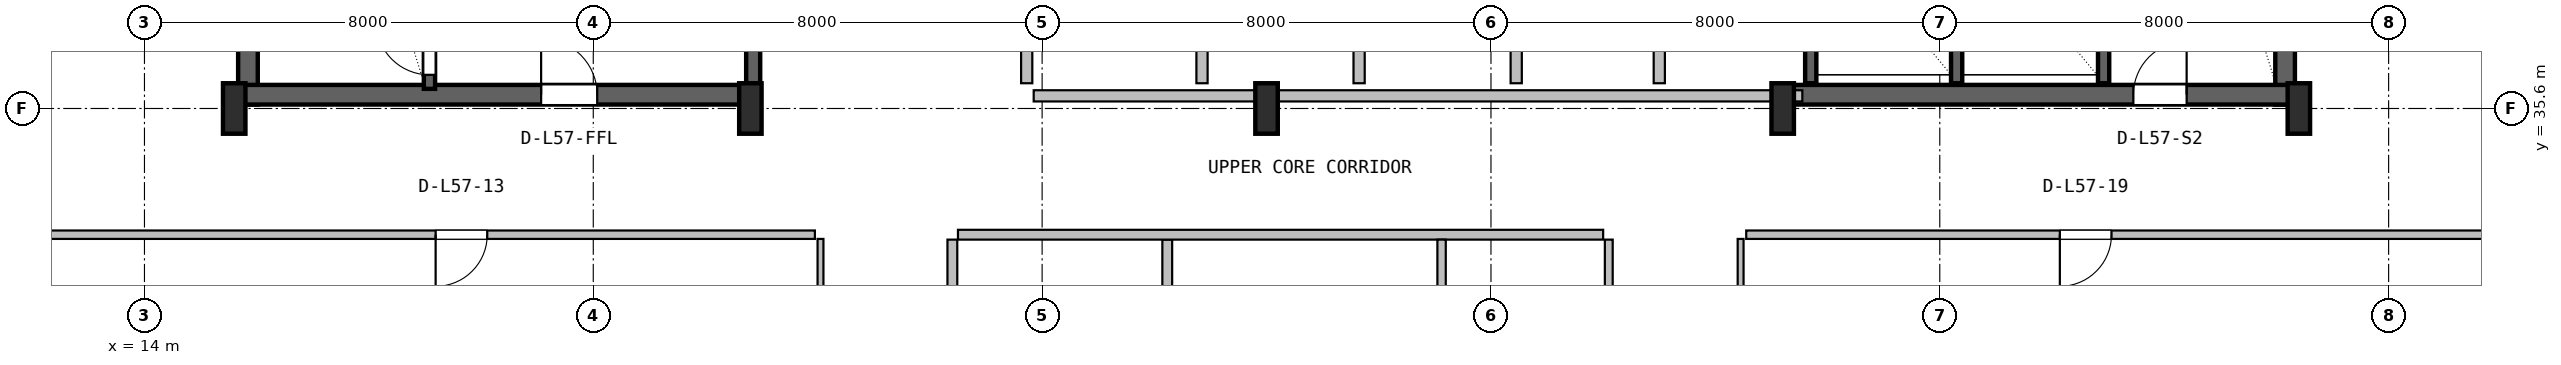
"""IFC4 building model, lengths in metres.
Left out: names, types, materials, properties, quantities, classifications, styles, units other than length and angle.
Written with IfcOpenShell. Run it as: python <this file> out.ifc"""

import sys

from ifc_helpers import new_model, si_unit, direction, frame, frame_2d, origin, origin_2d, place, context, subcontext, project, spatial, rectangle, i_section, extrude, source, transform, mapped, element, fill, save


model = new_model("IFC4")
c1 = context("Model", 3, precision=1e-05, world=origin(), true_north=direction((0.0, 1.0)))
c2 = subcontext(c1, "Body", "Model", "MODEL_VIEW")
j1 = project(units=[si_unit("LENGTHUNIT", "METRE"), si_unit("PLANEANGLEUNIT", "RADIAN")], contexts=[c1])
p1 = place(None, origin())
s1 = spatial("IfcSite", under=j1, at=p1, CompositionType="ELEMENT")
p2 = place(p1, origin())
s2 = spatial("IfcBuilding", under=s1, at=p2, CompositionType="ELEMENT")
p3 = place(p2, frame((0.0, 0.0, 230.2)))
s3 = spatial("IfcBuildingStorey", under=s2, at=p3, CompositionType="ELEMENT", Elevation=230.2)
for number, where, z_axis, x_axis in (
    (1, (15.845, 35.67, 0.0), (0.0, 0.0, 1.0), (0.0, 1.0, 0.0)),
    (2, (52.155, 35.67, 0.0), (0.0, 0.0, 1.0), (0.0, 1.0, 0.0)),
):
    element("IfcWall", number, at=place(p3, frame(where, z_axis=z_axis, x_axis=x_axis)), inside=s3, PredefinedType="SHEAR", context=c2, shape_type="SweptSolid", body=[
        extrude(rectangle(XDim=11.13, YDim=0.35, at=frame_2d((5.565, 0.0))), origin(), (0.0, 0.0, 1.0), 3.48),
    ])
p4 = place(p3, frame((15.67, 35.845, 0.0), z_axis=(0.0, 0.0, 1.0), x_axis=(1.0, 0.0, 0.0)))
e3 = element("IfcWall", 3, at=p4, inside=s3, PredefinedType="SHEAR", context=c2, shape_type="SweptSolid", body=[
    extrude(rectangle(XDim=9.13, YDim=0.35, at=frame_2d((4.565, 0.0))), origin(), (0.0, 0.0, 1.0), 3.48),
])
p5 = place(p4, frame((5.4, 0.0, 0.0)))
e4 = element("IfcOpeningElement", 4, at=p5, cuts=e3, PredefinedType="OPENING", context=c2, shape_type="SweptSolid", body=[
    extrude(rectangle(XDim=1.0, YDim=2.1, at=frame_2d((0.5, 1.05))), frame((0.0, 0.185, 0.0), z_axis=(0.0, -1.0, 0.0), x_axis=(1.0, 0.0, 0.0)), (0.0, 0.0, 1.0), 0.37),
])
p6 = place(p3, frame((43.2, 35.845, 0.0), z_axis=(0.0, 0.0, 1.0), x_axis=(1.0, 0.0, 0.0)))
e5 = element("IfcWall", 5, at=p6, inside=s3, PredefinedType="SHEAR", context=c2, shape_type="SweptSolid", body=[
    extrude(rectangle(XDim=9.13, YDim=0.35, at=frame_2d((4.565, 0.0))), origin(), (0.0, 0.0, 1.0), 3.48),
])
p7 = place(p6, frame((6.25, 0.0, 0.0)))
e6 = element("IfcOpeningElement", 6, at=p7, cuts=e5, PredefinedType="OPENING", context=c2, shape_type="SweptSolid", body=[
    extrude(rectangle(XDim=0.95, YDim=2.1, at=frame_2d((0.475, 1.05))), frame((0.0, 0.185, 0.0), z_axis=(0.0, -1.0, 0.0), x_axis=(1.0, 0.0, 0.0)), (0.0, 0.0, 1.0), 0.37),
])
m1 = source(origin(), c2, "Body", "SweptSolid", [
    extrude(i_section(OverallWidth=0.4, OverallDepth=0.9, WebThickness=0.016, FlangeThickness=0.028, FilletRadius=0.016, at=origin_2d()), origin(), (0.0, 0.0, 1.0), 3.8),
])
for number, where, z_axis, x_axis in (
    (7, (15.6, 35.6, 0.0), (0.0, 0.0, 1.0), (1.0, 0.0, 0.0)),
    (8, (24.8, 35.6, 0.0), (0.0, 0.0, 1.0), (1.0, 0.0, 0.0)),
    (9, (34.0, 35.6, 0.0), (0.0, 0.0, 1.0), (1.0, 0.0, 0.0)),
    (10, (43.2, 35.6, 0.0), (0.0, 0.0, 1.0), (1.0, 0.0, 0.0)),
    (11, (52.4, 35.6, 0.0), (0.0, 0.0, 1.0), (1.0, 0.0, 0.0)),
):
    element("IfcColumn", number, at=place(p3, frame(where, z_axis=z_axis, x_axis=x_axis)), inside=s3, PredefinedType="COLUMN", context=c2, shape_type="MappedRepresentation", body=[
        mapped(m1, transform((0.0, 0.0, 0.0), x_axis=(1.0, 0.0, 0.0), y_axis=(0.0, 1.0, 0.0), z_axis=(0.0, 0.0, 1.0), scale=1.0)),
    ])
p8 = place(p3, frame((19.08, 35.95, 0.0), z_axis=(0.0, 0.0, 1.0), x_axis=(0.0, 1.0, 0.0)))
e12 = element("IfcWall", 12, at=p8, inside=s3, PredefinedType="SHEAR", context=c2, shape_type="SweptSolid", body=[
    extrude(rectangle(XDim=9.65, YDim=0.2, at=frame_2d((4.825, 0.0))), origin(), (0.0, 0.0, 1.0), 3.48),
])
p9 = place(p8, frame((0.25, 0.0, 0.0)))
e13 = element("IfcOpeningElement", 13, at=p9, cuts=e12, PredefinedType="OPENING", context=c2, shape_type="SweptSolid", body=[
    extrude(rectangle(XDim=0.95, YDim=2.1, at=frame_2d((0.475, 1.05))), frame((0.0, 0.11, 0.0), z_axis=(0.0, -1.0, 0.0), x_axis=(1.0, 0.0, 0.0)), (0.0, 0.0, 1.0), 0.22),
])
p10 = place(p3, frame((24.85, 36.05, 0.0), z_axis=(0.0, 0.0, 1.0), x_axis=(0.0, 1.0, 0.0)))
e14 = element("IfcWall", 14, at=p10, inside=s3, PredefinedType="SHEAR", context=c2, shape_type="SweptSolid", body=[
    extrude(rectangle(XDim=10.45, YDim=0.25, at=frame_2d((5.225, 0.0))), origin(), (0.0, 0.0, 1.0), 3.48),
])
p11 = place(p3, frame((48.92, 36.05, 0.0), z_axis=(0.0, 0.0, 1.0), x_axis=(0.0, 1.0, 0.0)))
e15 = element("IfcWall", 15, at=p11, inside=s3, PredefinedType="SHEAR", context=c2, shape_type="SweptSolid", body=[
    extrude(rectangle(XDim=10.5, YDim=0.2, at=frame_2d((5.25, 0.0))), origin(), (0.0, 0.0, 1.0), 3.48),
])
for number, where, z_axis, x_axis in (
    (16, (43.7, 36.05, 0.0), (0.0, 0.0, 1.0), (0.0, 1.0, 0.0)),
    (17, (46.3, 36.05, 0.0), (0.0, 0.0, 1.0), (0.0, 1.0, 0.0)),
):
    element("IfcWall", number, at=place(p3, frame(where, z_axis=z_axis, x_axis=x_axis)), inside=s3, PredefinedType="SHEAR", context=c2, shape_type="SweptSolid", body=[
        extrude(rectangle(XDim=3.05, YDim=0.2, at=frame_2d((1.525, 0.0))), origin(), (0.0, 0.0, 1.0), 3.48),
    ])
p12 = place(p3, frame((29.85, 35.825, 0.0), z_axis=(0.0, 0.0, 1.0), x_axis=(1.0, 0.0, 0.0)))
e18 = element("IfcWall", 18, at=p12, inside=s3, PredefinedType="SOLIDWALL", context=c2, shape_type="SweptSolid", body=[
    extrude(rectangle(XDim=13.7, YDim=0.2, at=frame_2d((6.85, 0.0))), origin(), (0.0, 0.0, 1.0), 2.505),
])
for number, where, z_axis, x_axis in (
    (19, (32.85, 36.05, 0.0), (0.0, 0.0, 1.0), (0.0, 1.0, 0.0)),
    (20, (29.725, 36.05, 0.0), (0.0, 0.0, 1.0), (0.0, 1.0, 0.0)),
    (21, (35.65, 36.05, 0.0), (0.0, 0.0, 1.0), (0.0, 1.0, 0.0)),
    (22, (38.45, 36.05, 0.0), (0.0, 0.0, 1.0), (0.0, 1.0, 0.0)),
):
    element("IfcWall", number, at=place(p3, frame(where, z_axis=z_axis, x_axis=x_axis)), inside=s3, PredefinedType="PLUMBINGWALL", context=c2, shape_type="SweptSolid", body=[
        extrude(rectangle(XDim=3.1, YDim=0.2, at=frame_2d((1.55, 0.0))), origin(), (0.0, 0.0, 1.0), 3.46),
    ])
p13 = place(p3, frame((41.0, 36.05, 0.0), z_axis=(0.0, 0.0, 1.0), x_axis=(0.0, 1.0, 0.0)))
e23 = element("IfcWall", 23, at=p13, inside=s3, PredefinedType="SOLIDWALL", context=c2, shape_type="SweptSolid", body=[
    extrude(rectangle(XDim=3.1, YDim=0.2, at=frame_2d((1.55, 0.0))), origin(), (0.0, 0.0, 1.0), 3.46),
])
p14 = place(p3, frame((26.05, 22.235, 0.0), z_axis=(0.0, 0.0, 1.0), x_axis=(0.0, 1.0, 0.0)))
e24 = element("IfcWall", 24, at=p14, inside=s3, PredefinedType="PARTITIONING", context=c2, shape_type="SweptSolid", body=[
    extrude(rectangle(XDim=11.04, YDim=0.105, at=frame_2d((5.52, 0.0))), origin(), (0.0, 0.0, 1.0), 2.838),
])
p15 = place(p14, frame((0.385, 0.0, 0.0)))
e25 = element("IfcOpeningElement", 25, at=p15, cuts=e24, PredefinedType="OPENING", context=c2, shape_type="SweptSolid", body=[
    extrude(rectangle(XDim=0.88, YDim=2.06, at=frame_2d((0.44, 1.03))), frame((0.0, 0.062, 0.0), z_axis=(0.0, -1.0, 0.0), x_axis=(1.0, 0.0, 0.0)), (0.0, 0.0, 1.0), 0.125),
])
p16 = place(p14, frame((3.975, 0.0, 0.0)))
e26 = element("IfcOpeningElement", 26, at=p16, cuts=e24, PredefinedType="OPENING", context=c2, shape_type="SweptSolid", body=[
    extrude(rectangle(XDim=0.92, YDim=2.08, at=frame_2d((0.46, 1.04))), frame((0.0, 0.062, 0.0), z_axis=(0.0, -1.0, 0.0), x_axis=(1.0, 0.0, 0.0)), (0.0, 0.0, 1.0), 0.125),
])
p17 = place(p3, frame((9.68, 33.35, 0.0), z_axis=(0.0, 0.0, 1.0), x_axis=(1.0, 0.0, 0.0)))
e27 = element("IfcWall", 27, at=p17, inside=s3, PredefinedType="PARTITIONING", context=c2, shape_type="SweptSolid", body=[
    extrude(rectangle(XDim=16.27, YDim=0.15, at=frame_2d((8.135, 0.0))), origin(), (0.0, 0.0, 1.0), 2.838),
])
p18 = place(p17, frame((9.51, 0.0, 0.0)))
e28 = element("IfcOpeningElement", 28, at=p18, cuts=e27, PredefinedType="OPENING", context=c2, shape_type="SweptSolid", body=[
    extrude(rectangle(XDim=0.92, YDim=2.08, at=frame_2d((0.46, 1.04))), frame((0.0, 0.085, 0.0), z_axis=(0.0, -1.0, 0.0), x_axis=(1.0, 0.0, 0.0)), (0.0, 0.0, 1.0), 0.17),
])
p19 = place(p3, frame((32.23, 24.598, 0.0), z_axis=(0.0, 0.0, 1.0), x_axis=(0.0, 1.0, 0.0)))
e29 = element("IfcWall", 29, at=p19, inside=s3, PredefinedType="PARTITIONING", context=c2, shape_type="SweptSolid", body=[
    extrude(rectangle(XDim=8.665, YDim=0.175, at=frame_2d((4.333, 0.0))), origin(), (0.0, 0.0, 1.0), 3.152),
])
p20 = place(p3, frame((28.5, 33.35, 0.0), z_axis=(0.0, 0.0, 1.0), x_axis=(1.0, 0.0, 0.0)))
e30 = element("IfcWall", 30, at=p20, inside=s3, PredefinedType="PARTITIONING", context=c2, shape_type="SweptSolid", body=[
    extrude(rectangle(XDim=11.5, YDim=0.175, at=frame_2d((5.75, 0.0))), origin(), (0.0, 0.0, 1.0), 2.838),
])
p21 = place(p3, frame((28.4, 24.598, 0.0), z_axis=(0.0, 0.0, 1.0), x_axis=(0.0, 1.0, 0.0)))
e31 = element("IfcWall", 31, at=p21, inside=s3, PredefinedType="PARTITIONING", context=c2, shape_type="SweptSolid", body=[
    extrude(rectangle(XDim=8.665, YDim=0.175, at=frame_2d((4.333, 0.0))), origin(), (0.0, 0.0, 1.0), 3.152),
])
p22 = place(p21, frame((3.807, 0.0, 0.0)))
e32 = element("IfcOpeningElement", 32, at=p22, cuts=e31, PredefinedType="OPENING", context=c2, shape_type="SweptSolid", body=[
    extrude(rectangle(XDim=1.05, YDim=2.1, at=frame_2d((0.525, 1.05))), frame((0.0, 0.098, 0.0), z_axis=(0.0, -1.0, 0.0), x_axis=(1.0, 0.0, 0.0)), (0.0, 0.0, 1.0), 0.195),
])
p23 = place(p3, frame((37.12, 24.598, 0.0), z_axis=(0.0, 0.0, 1.0), x_axis=(0.0, 1.0, 0.0)))
e33 = element("IfcWall", 33, at=p23, inside=s3, PredefinedType="PARTITIONING", context=c2, shape_type="SweptSolid", body=[
    extrude(rectangle(XDim=8.665, YDim=0.15, at=frame_2d((4.333, 0.0))), origin(), (0.0, 0.0, 1.0), 3.152),
])
p24 = place(p3, frame((40.1, 24.598, 0.0), z_axis=(0.0, 0.0, 1.0), x_axis=(0.0, 1.0, 0.0)))
e34 = element("IfcWall", 34, at=p24, inside=s3, PredefinedType="PARTITIONING", context=c2, shape_type="SweptSolid", body=[
    extrude(rectangle(XDim=8.665, YDim=0.14, at=frame_2d((4.333, 0.0))), origin(), (0.0, 0.0, 1.0), 3.152),
])
p25 = place(p24, frame((3.832, 0.0, 0.0)))
e35 = element("IfcOpeningElement", 35, at=p25, cuts=e34, PredefinedType="OPENING", context=c2, shape_type="SweptSolid", body=[
    extrude(rectangle(XDim=1.0, YDim=2.1, at=frame_2d((0.5, 1.05))), frame((0.0, 0.08, 0.0), z_axis=(0.0, -1.0, 0.0), x_axis=(1.0, 0.0, 0.0)), (0.0, 0.0, 1.0), 0.16),
])
p26 = place(p3, frame((42.45, 22.235, 0.0), z_axis=(0.0, 0.0, 1.0), x_axis=(0.0, 1.0, 0.0)))
e36 = element("IfcWall", 36, at=p26, inside=s3, PredefinedType="PARTITIONING", context=c2, shape_type="SweptSolid", body=[
    extrude(rectangle(XDim=11.04, YDim=0.105, at=frame_2d((5.52, 0.0))), origin(), (0.0, 0.0, 1.0), 2.838),
])
p27 = place(p26, frame((2.57, 0.0, 0.0)))
e37 = element("IfcOpeningElement", 37, at=p27, cuts=e36, PredefinedType="OPENING", context=c2, shape_type="SweptSolid", body=[
    extrude(rectangle(XDim=0.88, YDim=2.06, at=frame_2d((0.44, 1.03))), frame((0.0, 0.062, 0.0), z_axis=(0.0, -1.0, 0.0), x_axis=(1.0, 0.0, 0.0)), (0.0, 0.0, 1.0), 0.125),
])
p28 = place(p26, frame((5.605, 0.0, 0.0)))
e38 = element("IfcOpeningElement", 38, at=p28, cuts=e36, PredefinedType="OPENING", context=c2, shape_type="SweptSolid", body=[
    extrude(rectangle(XDim=0.92, YDim=2.08, at=frame_2d((0.46, 1.04))), frame((0.0, 0.062, 0.0), z_axis=(0.0, -1.0, 0.0), x_axis=(1.0, 0.0, 0.0)), (0.0, 0.0, 1.0), 0.125),
])
p29 = place(p3, frame((42.55, 33.35, 0.0), z_axis=(0.0, 0.0, 1.0), x_axis=(1.0, 0.0, 0.0)))
e39 = element("IfcWall", 39, at=p29, inside=s3, PredefinedType="PARTITIONING", context=c2, shape_type="SweptSolid", body=[
    extrude(rectangle(XDim=15.77, YDim=0.15, at=frame_2d((7.885, 0.0))), origin(), (0.0, 0.0, 1.0), 2.838),
])
p30 = place(p29, frame((5.59, 0.0, 0.0)))
e40 = element("IfcOpeningElement", 40, at=p30, cuts=e39, PredefinedType="OPENING", context=c2, shape_type="SweptSolid", body=[
    extrude(rectangle(XDim=0.92, YDim=2.08, at=frame_2d((0.46, 1.04))), frame((0.0, 0.085, 0.0), z_axis=(0.0, -1.0, 0.0), x_axis=(1.0, 0.0, 0.0)), (0.0, 0.0, 1.0), 0.17),
])
m2 = source(origin(), c2, "Body", "SweptSolid", [
    extrude(rectangle(XDim=0.95, YDim=2.1, at=frame_2d((0.475, 1.05))), frame((0.0, 0.025, 0.0), z_axis=(0.0, -1.0, 0.0), x_axis=(1.0, 0.0, 0.0)), (0.0, 0.0, 1.0), 0.05),
])
p31 = place(p9, origin())
e41 = element("IfcDoor", 41, at=p31, inside=s3, OperationType="SINGLE_SWING_RIGHT", PredefinedType="DOOR", context=c2, shape_type="MappedRepresentation", body=[
    mapped(m2, transform((0.0, 0.0, 0.0), x_axis=(1.0, 0.0, 0.0), y_axis=(0.0, 1.0, 0.0), z_axis=(0.0, 0.0, 1.0), scale=1.0)),
])
fill(e13, e41)
m3 = source(origin(), c2, "Body", "SweptSolid", [
    extrude(rectangle(XDim=1.0, YDim=2.1, at=frame_2d((0.5, 1.05))), frame((0.0, 0.025, 0.0), z_axis=(0.0, -1.0, 0.0), x_axis=(1.0, 0.0, 0.0)), (0.0, 0.0, 1.0), 0.05),
])
p32 = place(p5, origin())
e42 = element("IfcDoor", 42, at=p32, inside=s3, OperationType="SINGLE_SWING_LEFT", PredefinedType="DOOR", context=c2, shape_type="MappedRepresentation", body=[
    mapped(m3, transform((0.0, 0.0, 0.0), x_axis=(1.0, 0.0, 0.0), y_axis=(0.0, 1.0, 0.0), z_axis=(0.0, 0.0, 1.0), scale=1.0)),
])
fill(e4, e42)
p33 = place(p7, origin())
e43 = element("IfcDoor", 43, at=p33, inside=s3, OperationType="SINGLE_SWING_RIGHT", PredefinedType="DOOR", context=c2, shape_type="MappedRepresentation", body=[
    mapped(m2, transform((0.0, 0.0, 0.0), x_axis=(1.0, 0.0, 0.0), y_axis=(0.0, 1.0, 0.0), z_axis=(0.0, 0.0, 1.0), scale=1.0)),
])
fill(e6, e43)
m4 = source(origin(), c2, "Body", "SweptSolid", [
    extrude(rectangle(XDim=0.92, YDim=2.08, at=frame_2d((0.46, 1.04))), frame((0.0, 0.025, 0.0), z_axis=(0.0, -1.0, 0.0), x_axis=(1.0, 0.0, 0.0)), (0.0, 0.0, 1.0), 0.05),
])
p34 = place(p18, frame((0.92, 0.0, 0.0), z_axis=(0.0, 0.0, 1.0), x_axis=(-1.0, 0.0, 0.0)))
e44 = element("IfcDoor", 44, at=p34, inside=s3, OperationType="SINGLE_SWING_LEFT", PredefinedType="DOOR", context=c2, shape_type="MappedRepresentation", body=[
    mapped(m4, transform((0.0, 0.0, 0.0), x_axis=(1.0, 0.0, 0.0), y_axis=(0.0, 1.0, 0.0), z_axis=(0.0, 0.0, 1.0), scale=1.0)),
])
fill(e28, e44)
p35 = place(p30, frame((0.92, 0.0, 0.0), z_axis=(0.0, 0.0, 1.0), x_axis=(-1.0, 0.0, 0.0)))
e45 = element("IfcDoor", 45, at=p35, inside=s3, OperationType="SINGLE_SWING_LEFT", PredefinedType="DOOR", context=c2, shape_type="MappedRepresentation", body=[
    mapped(m4, transform((0.0, 0.0, 0.0), x_axis=(1.0, 0.0, 0.0), y_axis=(0.0, 1.0, 0.0), z_axis=(0.0, 0.0, 1.0), scale=1.0)),
])
fill(e40, e45)
save(model, sys.argv[1])
